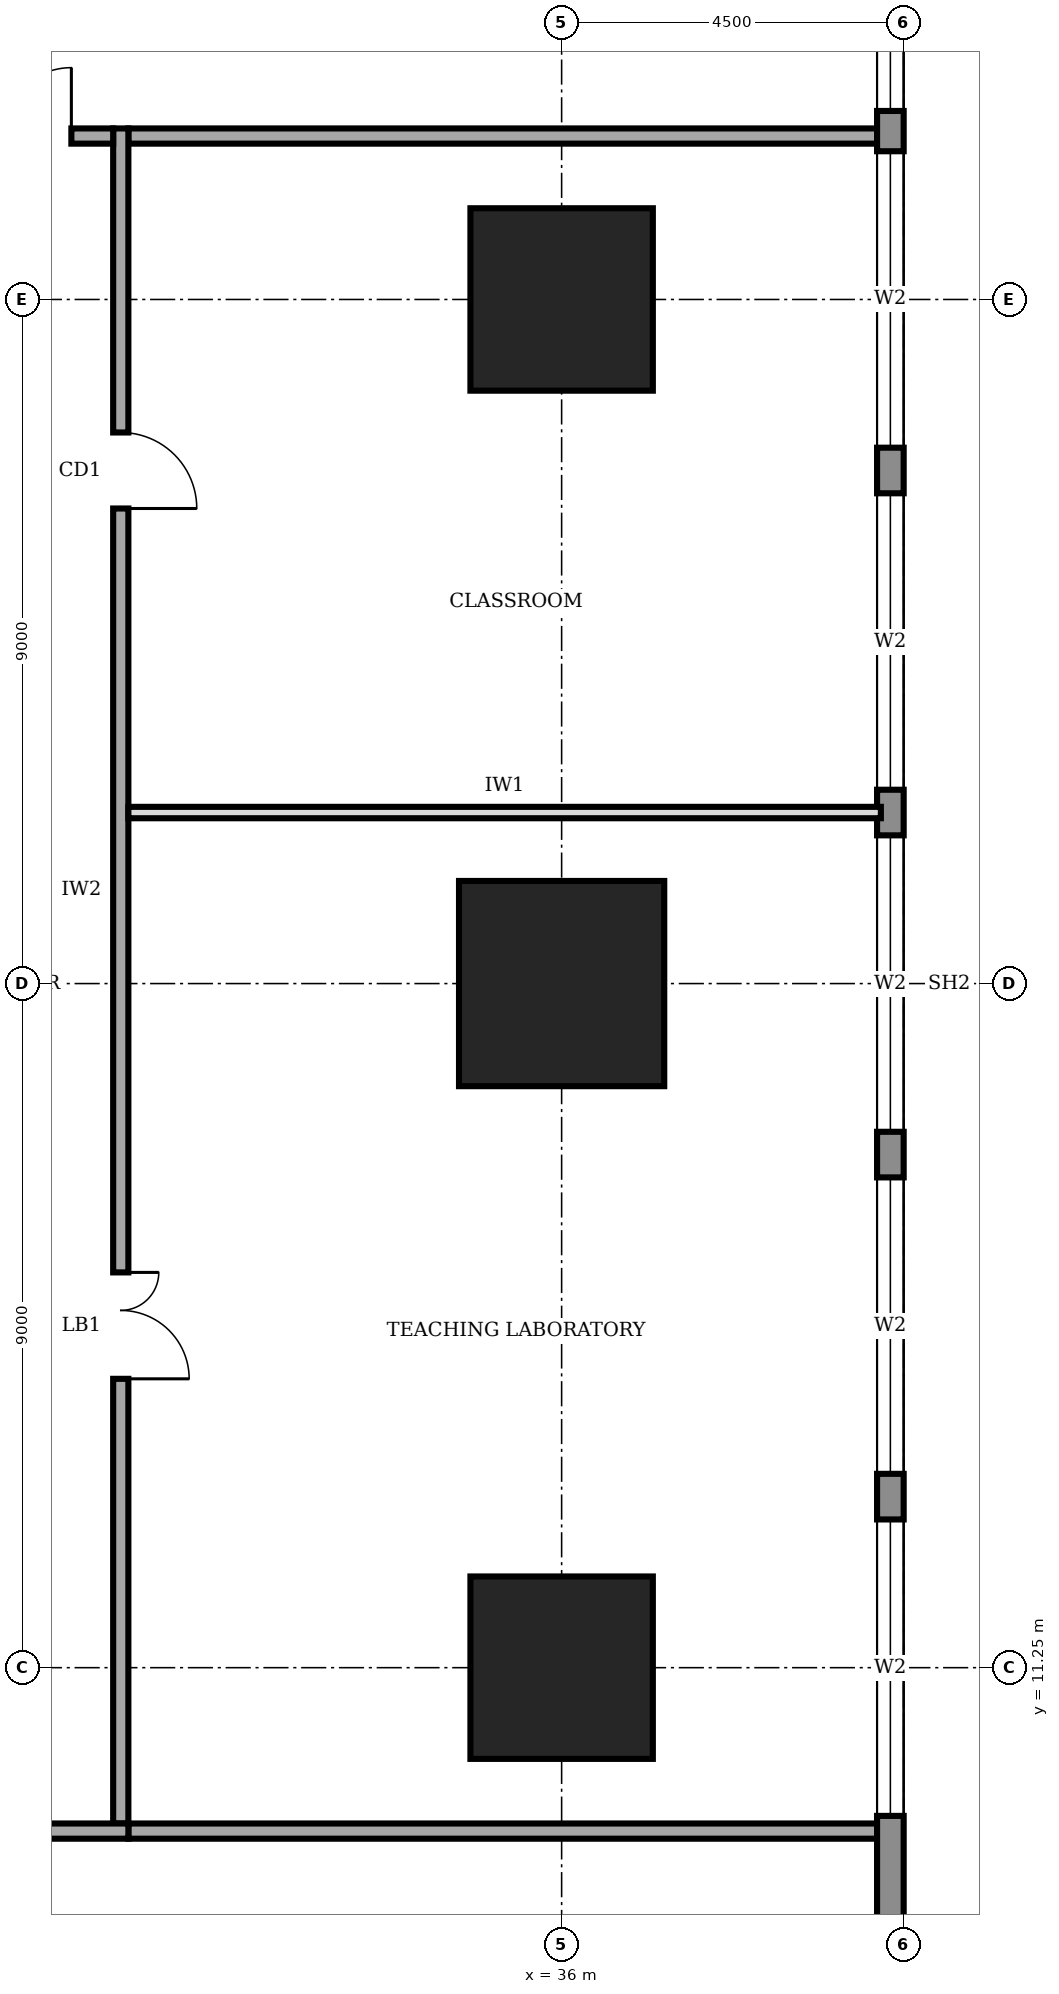
"""IFC4 building model, lengths in metres.
Left out: names, types, materials, properties, quantities, classifications, styles, units other than length and angle.
Written with IfcOpenShell. Run it as: python <this file> out.ifc"""

import sys

from ifc_helpers import new_model, si_unit, direction, frame, frame_2d, origin, origin_2d, place, context, subcontext, project, spatial, rectangle, extrude, element, fill, save


model = new_model("IFC4")
c1 = context("Model", 3, precision=1e-05, world=origin(), true_north=direction((0.0, 1.0)))
c2 = subcontext(c1, "Body", "Model", "MODEL_VIEW")
j1 = project(units=[si_unit("LENGTHUNIT", "METRE"), si_unit("PLANEANGLEUNIT", "RADIAN")], contexts=[c1])
p1 = place(None, origin())
s1 = spatial("IfcSite", under=j1, at=p1, CompositionType="ELEMENT")
p2 = place(p1, origin())
s2 = spatial("IfcBuilding", under=s1, at=p2, CompositionType="ELEMENT")
p3 = place(p2, frame((0.0, 0.0, 65.0)))
s3 = spatial("IfcBuildingStorey", under=s2, at=p3, CompositionType="ELEMENT", Elevation=65.0)
p4 = place(p3, frame((36.0, 11.25, 0.0), z_axis=(0.0, 0.0, 1.0), x_axis=(1.0, 0.0, 0.0)))
e1 = element("IfcColumn", 1, at=p4, inside=s3, PredefinedType="COLUMN", context=c2, shape_type="SweptSolid", body=[
    extrude(rectangle(XDim=2.4, YDim=2.4, at=origin_2d()), origin(), (0.0, 0.0, 1.0), 4.0),
])
p5 = place(p3, frame((36.0, 20.25, 0.0), z_axis=(0.0, 0.0, 1.0), x_axis=(1.0, 0.0, 0.0)))
e2 = element("IfcColumn", 2, at=p5, inside=s3, PredefinedType="COLUMN", context=c2, shape_type="SweptSolid", body=[
    extrude(rectangle(XDim=2.7, YDim=2.7, at=origin_2d()), origin(), (0.0, 0.0, 1.0), 4.0),
])
p6 = place(p3, frame((36.0, 29.25, 0.0), z_axis=(0.0, 0.0, 1.0), x_axis=(1.0, 0.0, 0.0)))
e3 = element("IfcColumn", 3, at=p6, inside=s3, PredefinedType="COLUMN", context=c2, shape_type="SweptSolid", body=[
    extrude(rectangle(XDim=2.4, YDim=2.4, at=origin_2d()), origin(), (0.0, 0.0, 1.0), 4.0),
])
p7 = place(p3, frame((40.325, 4.52, 0.0), z_axis=(0.0, 0.0, 1.0), x_axis=(0.0, 1.0, 0.0)))
e4 = element("IfcWall", 4, at=p7, inside=s3, PredefinedType="STANDARD", context=c2, shape_type="SweptSolid", body=[
    extrude(rectangle(XDim=31.46, YDim=0.35, at=frame_2d((15.73, 0.0))), origin(), (0.0, 0.0, 1.0), 3.75),
])
p8 = place(p7, frame((4.78, 0.0, 0.6)))
e5 = element("IfcOpeningElement", 5, at=p8, cuts=e4, PredefinedType="OPENING", context=c2, shape_type="SweptSolid", body=[
    extrude(rectangle(XDim=3.9, YDim=2.6, at=frame_2d((1.95, 1.3))), frame((0.0, 0.185, 0.0), z_axis=(0.0, -1.0, 0.0), x_axis=(1.0, 0.0, 0.0)), (0.0, 0.0, 1.0), 0.37),
])
p9 = place(p7, frame((9.28, 0.0, 0.6)))
e6 = element("IfcOpeningElement", 6, at=p9, cuts=e4, PredefinedType="OPENING", context=c2, shape_type="SweptSolid", body=[
    extrude(rectangle(XDim=3.9, YDim=2.6, at=frame_2d((1.95, 1.3))), frame((0.0, 0.185, 0.0), z_axis=(0.0, -1.0, 0.0), x_axis=(1.0, 0.0, 0.0)), (0.0, 0.0, 1.0), 0.37),
])
p10 = place(p7, frame((13.78, 0.0, 0.6)))
e7 = element("IfcOpeningElement", 7, at=p10, cuts=e4, PredefinedType="OPENING", context=c2, shape_type="SweptSolid", body=[
    extrude(rectangle(XDim=3.9, YDim=2.6, at=frame_2d((1.95, 1.3))), frame((0.0, 0.185, 0.0), z_axis=(0.0, -1.0, 0.0), x_axis=(1.0, 0.0, 0.0)), (0.0, 0.0, 1.0), 0.37),
])
p11 = place(p7, frame((18.28, 0.0, 0.6)))
e8 = element("IfcOpeningElement", 8, at=p11, cuts=e4, PredefinedType="OPENING", context=c2, shape_type="SweptSolid", body=[
    extrude(rectangle(XDim=3.9, YDim=2.6, at=frame_2d((1.95, 1.3))), frame((0.0, 0.185, 0.0), z_axis=(0.0, -1.0, 0.0), x_axis=(1.0, 0.0, 0.0)), (0.0, 0.0, 1.0), 0.37),
])
p12 = place(p7, frame((22.78, 0.0, 0.6)))
e9 = element("IfcOpeningElement", 9, at=p12, cuts=e4, PredefinedType="OPENING", context=c2, shape_type="SweptSolid", body=[
    extrude(rectangle(XDim=3.9, YDim=2.6, at=frame_2d((1.95, 1.3))), frame((0.0, 0.185, 0.0), z_axis=(0.0, -1.0, 0.0), x_axis=(1.0, 0.0, 0.0)), (0.0, 0.0, 1.0), 0.37),
])
p13 = place(p7, frame((27.21, 0.0, 0.6)))
e10 = element("IfcOpeningElement", 10, at=p13, cuts=e4, PredefinedType="OPENING", context=c2, shape_type="SweptSolid", body=[
    extrude(rectangle(XDim=3.9, YDim=2.6, at=frame_2d((1.95, 1.3))), frame((0.0, 0.185, 0.0), z_axis=(0.0, -1.0, 0.0), x_axis=(1.0, 0.0, 0.0)), (0.0, 0.0, 1.0), 0.37),
])
p14 = place(p3, frame((11.9, 9.1, 0.0), z_axis=(0.0, 0.0, 1.0), x_axis=(1.0, 0.0, 0.0)))
e11 = element("IfcWall", 11, at=p14, inside=s3, PredefinedType="SOLIDWALL", context=c2, shape_type="SweptSolid", body=[
    extrude(rectangle(XDim=18.4, YDim=0.2, at=frame_2d((9.2, 0.0))), origin(), (0.0, 0.0, 1.0), 3.75),
])
p15 = place(p14, frame((2.25, 0.0, 0.0)))
e12 = element("IfcOpeningElement", 12, at=p15, cuts=e11, PredefinedType="OPENING", context=c2, shape_type="SweptSolid", body=[
    extrude(rectangle(XDim=1.4, YDim=2.1, at=frame_2d((0.7, 1.05))), frame((0.0, 0.11, 0.0), z_axis=(0.0, -1.0, 0.0), x_axis=(1.0, 0.0, 0.0)), (0.0, 0.0, 1.0), 0.22),
])
p16 = place(p14, frame((7.85, 0.0, 0.0)))
e13 = element("IfcOpeningElement", 13, at=p16, cuts=e11, PredefinedType="OPENING", context=c2, shape_type="SweptSolid", body=[
    extrude(rectangle(XDim=1.0, YDim=2.1, at=frame_2d((0.5, 1.05))), frame((0.0, 0.11, 0.0), z_axis=(0.0, -1.0, 0.0), x_axis=(1.0, 0.0, 0.0)), (0.0, 0.0, 1.0), 0.22),
])
p17 = place(p14, frame((13.8, 0.0, 0.0)))
e14 = element("IfcOpeningElement", 14, at=p17, cuts=e11, PredefinedType="OPENING", context=c2, shape_type="SweptSolid", body=[
    extrude(rectangle(XDim=1.4, YDim=2.1, at=frame_2d((0.7, 1.05))), frame((0.0, 0.11, 0.0), z_axis=(0.0, -1.0, 0.0), x_axis=(1.0, 0.0, 0.0)), (0.0, 0.0, 1.0), 0.22),
])
p18 = place(p3, frame((30.2, 9.2, 0.0), z_axis=(0.0, 0.0, 1.0), x_axis=(0.0, 1.0, 0.0)))
e15 = element("IfcWall", 15, at=p18, inside=s3, PredefinedType="SOLIDWALL", context=c2, shape_type="SweptSolid", body=[
    extrude(rectangle(XDim=22.3, YDim=0.2, at=frame_2d((11.15, 0.0))), origin(), (0.0, 0.0, 1.0), 3.75),
])
p19 = place(p18, frame((5.85, 0.0, 0.0)))
e16 = element("IfcOpeningElement", 16, at=p19, cuts=e15, PredefinedType="OPENING", context=c2, shape_type="SweptSolid", body=[
    extrude(rectangle(XDim=1.4, YDim=2.1, at=frame_2d((0.7, 1.05))), frame((0.0, 0.11, 0.0), z_axis=(0.0, -1.0, 0.0), x_axis=(1.0, 0.0, 0.0)), (0.0, 0.0, 1.0), 0.22),
])
p20 = place(p18, frame((17.3, 0.0, 0.0)))
e17 = element("IfcOpeningElement", 17, at=p20, cuts=e15, PredefinedType="OPENING", context=c2, shape_type="SweptSolid", body=[
    extrude(rectangle(XDim=1.0, YDim=2.1, at=frame_2d((0.5, 1.05))), frame((0.0, 0.11, 0.0), z_axis=(0.0, -1.0, 0.0), x_axis=(1.0, 0.0, 0.0)), (0.0, 0.0, 1.0), 0.22),
])
p21 = place(p3, frame((30.1, 31.4, 0.0), z_axis=(0.0, 0.0, 1.0), x_axis=(-1.0, 0.0, 0.0)))
e18 = element("IfcWall", 18, at=p21, inside=s3, PredefinedType="SOLIDWALL", context=c2, shape_type="SweptSolid", body=[
    extrude(rectangle(XDim=18.4, YDim=0.2, at=frame_2d((9.2, 0.0))), origin(), (0.0, 0.0, 1.0), 3.75),
])
p22 = place(p21, frame((14.55, 0.0, 0.0)))
e19 = element("IfcOpeningElement", 19, at=p22, cuts=e18, PredefinedType="OPENING", context=c2, shape_type="SweptSolid", body=[
    extrude(rectangle(XDim=1.4, YDim=2.1, at=frame_2d((0.7, 1.05))), frame((0.0, 0.11, 0.0), z_axis=(0.0, -1.0, 0.0), x_axis=(1.0, 0.0, 0.0)), (0.0, 0.0, 1.0), 0.22),
])
p23 = place(p21, frame((7.1, 0.0, 0.0)))
e20 = element("IfcOpeningElement", 20, at=p23, cuts=e18, PredefinedType="OPENING", context=c2, shape_type="SweptSolid", body=[
    extrude(rectangle(XDim=1.0, YDim=2.1, at=frame_2d((0.5, 1.05))), frame((0.0, 0.11, 0.0), z_axis=(0.0, -1.0, 0.0), x_axis=(1.0, 0.0, 0.0)), (0.0, 0.0, 1.0), 0.22),
])
p24 = place(p21, frame((0.55, 0.0, 0.0)))
e21 = element("IfcOpeningElement", 21, at=p24, cuts=e18, PredefinedType="OPENING", context=c2, shape_type="SweptSolid", body=[
    extrude(rectangle(XDim=1.8, YDim=2.1, at=frame_2d((0.9, 1.05))), frame((0.0, 0.11, 0.0), z_axis=(0.0, -1.0, 0.0), x_axis=(1.0, 0.0, 0.0)), (0.0, 0.0, 1.0), 0.22),
])
for number, where, z_axis, x_axis in (
    (22, (30.3, 9.1, 0.0), (0.0, 0.0, 1.0), (1.0, 0.0, 0.0)),
    (23, (30.3, 31.4, 0.0), (0.0, 0.0, 1.0), (1.0, 0.0, 0.0)),
):
    element("IfcWall", number, at=place(p3, frame(where, z_axis=z_axis, x_axis=x_axis)), inside=s3, PredefinedType="SOLIDWALL", context=c2, shape_type="SweptSolid", body=[
        extrude(rectangle(XDim=9.9, YDim=0.2, at=frame_2d((4.95, 0.0))), origin(), (0.0, 0.0, 1.0), 3.75),
    ])
p25 = place(p3, frame((30.3, 22.5, 0.0), z_axis=(0.0, 0.0, 1.0), x_axis=(1.0, 0.0, 0.0)))
e24 = element("IfcWall", 24, at=p25, inside=s3, PredefinedType="PARTITIONING", context=c2, shape_type="SweptSolid", body=[
    extrude(rectangle(XDim=9.9, YDim=0.15, at=frame_2d((4.95, 0.0))), origin(), (0.0, 0.0, 1.0), 3.75),
])
p26 = place(p8, origin())
e25 = element("IfcWindow", 25, at=p26, inside=s3, PartitioningType="SINGLE_PANEL", PredefinedType="WINDOW", context=c2, shape_type="SweptSolid", body=[
    extrude(rectangle(XDim=3.9, YDim=2.6, at=frame_2d((1.95, 1.3))), frame((0.0, 0.03, 0.0), z_axis=(0.0, -1.0, 0.0), x_axis=(1.0, 0.0, 0.0)), (0.0, 0.0, 1.0), 0.06),
])
fill(e5, e25)
p27 = place(p9, origin())
e26 = element("IfcWindow", 26, at=p27, inside=s3, PartitioningType="SINGLE_PANEL", PredefinedType="WINDOW", context=c2, shape_type="SweptSolid", body=[
    extrude(rectangle(XDim=3.9, YDim=2.6, at=frame_2d((1.95, 1.3))), frame((0.0, 0.03, 0.0), z_axis=(0.0, -1.0, 0.0), x_axis=(1.0, 0.0, 0.0)), (0.0, 0.0, 1.0), 0.06),
])
fill(e6, e26)
p28 = place(p10, origin())
e27 = element("IfcWindow", 27, at=p28, inside=s3, PartitioningType="SINGLE_PANEL", PredefinedType="WINDOW", context=c2, shape_type="SweptSolid", body=[
    extrude(rectangle(XDim=3.9, YDim=2.6, at=frame_2d((1.95, 1.3))), frame((0.0, 0.03, 0.0), z_axis=(0.0, -1.0, 0.0), x_axis=(1.0, 0.0, 0.0)), (0.0, 0.0, 1.0), 0.06),
])
fill(e7, e27)
p29 = place(p11, origin())
e28 = element("IfcWindow", 28, at=p29, inside=s3, PartitioningType="SINGLE_PANEL", PredefinedType="WINDOW", context=c2, shape_type="SweptSolid", body=[
    extrude(rectangle(XDim=3.9, YDim=2.6, at=frame_2d((1.95, 1.3))), frame((0.0, 0.03, 0.0), z_axis=(0.0, -1.0, 0.0), x_axis=(1.0, 0.0, 0.0)), (0.0, 0.0, 1.0), 0.06),
])
fill(e8, e28)
p30 = place(p12, origin())
e29 = element("IfcWindow", 29, at=p30, inside=s3, PartitioningType="SINGLE_PANEL", PredefinedType="WINDOW", context=c2, shape_type="SweptSolid", body=[
    extrude(rectangle(XDim=3.9, YDim=2.6, at=frame_2d((1.95, 1.3))), frame((0.0, 0.03, 0.0), z_axis=(0.0, -1.0, 0.0), x_axis=(1.0, 0.0, 0.0)), (0.0, 0.0, 1.0), 0.06),
])
fill(e9, e29)
p31 = place(p13, origin())
e30 = element("IfcWindow", 30, at=p31, inside=s3, PartitioningType="SINGLE_PANEL", PredefinedType="WINDOW", context=c2, shape_type="SweptSolid", body=[
    extrude(rectangle(XDim=3.9, YDim=2.6, at=frame_2d((1.95, 1.3))), frame((0.0, 0.03, 0.0), z_axis=(0.0, -1.0, 0.0), x_axis=(1.0, 0.0, 0.0)), (0.0, 0.0, 1.0), 0.06),
])
fill(e10, e30)
p32 = place(p19, frame((1.4, 0.0, 0.0), z_axis=(0.0, 0.0, 1.0), x_axis=(-1.0, 0.0, 0.0)))
e31 = element("IfcDoor", 31, at=p32, inside=s3, OperationType="DOUBLE_DOOR_SINGLE_SWING", PredefinedType="DOOR", context=c2, shape_type="SweptSolid", body=[
    extrude(rectangle(XDim=1.4, YDim=2.1, at=frame_2d((0.7, 1.05))), frame((0.0, 0.025, 0.0), z_axis=(0.0, -1.0, 0.0), x_axis=(1.0, 0.0, 0.0)), (0.0, 0.0, 1.0), 0.05),
])
fill(e16, e31)
p33 = place(p20, frame((1.0, 0.0, 0.0), z_axis=(0.0, 0.0, 1.0), x_axis=(-1.0, 0.0, 0.0)))
e32 = element("IfcDoor", 32, at=p33, inside=s3, OperationType="SINGLE_SWING_RIGHT", PredefinedType="DOOR", context=c2, shape_type="SweptSolid", body=[
    extrude(rectangle(XDim=1.0, YDim=2.1, at=frame_2d((0.5, 1.05))), frame((0.0, 0.025, 0.0), z_axis=(0.0, -1.0, 0.0), x_axis=(1.0, 0.0, 0.0)), (0.0, 0.0, 1.0), 0.05),
])
fill(e17, e32)
p34 = place(p24, frame((1.8, 0.0, 0.0), z_axis=(0.0, 0.0, 1.0), x_axis=(-1.0, 0.0, 0.0)))
e33 = element("IfcDoor", 33, at=p34, inside=s3, OperationType="DOUBLE_DOOR_SINGLE_SWING", PredefinedType="DOOR", context=c2, shape_type="SweptSolid", body=[
    extrude(rectangle(XDim=1.8, YDim=2.1, at=frame_2d((0.9, 1.05))), frame((0.0, 0.025, 0.0), z_axis=(0.0, -1.0, 0.0), x_axis=(1.0, 0.0, 0.0)), (0.0, 0.0, 1.0), 0.05),
])
fill(e21, e33)
save(model, sys.argv[1])
